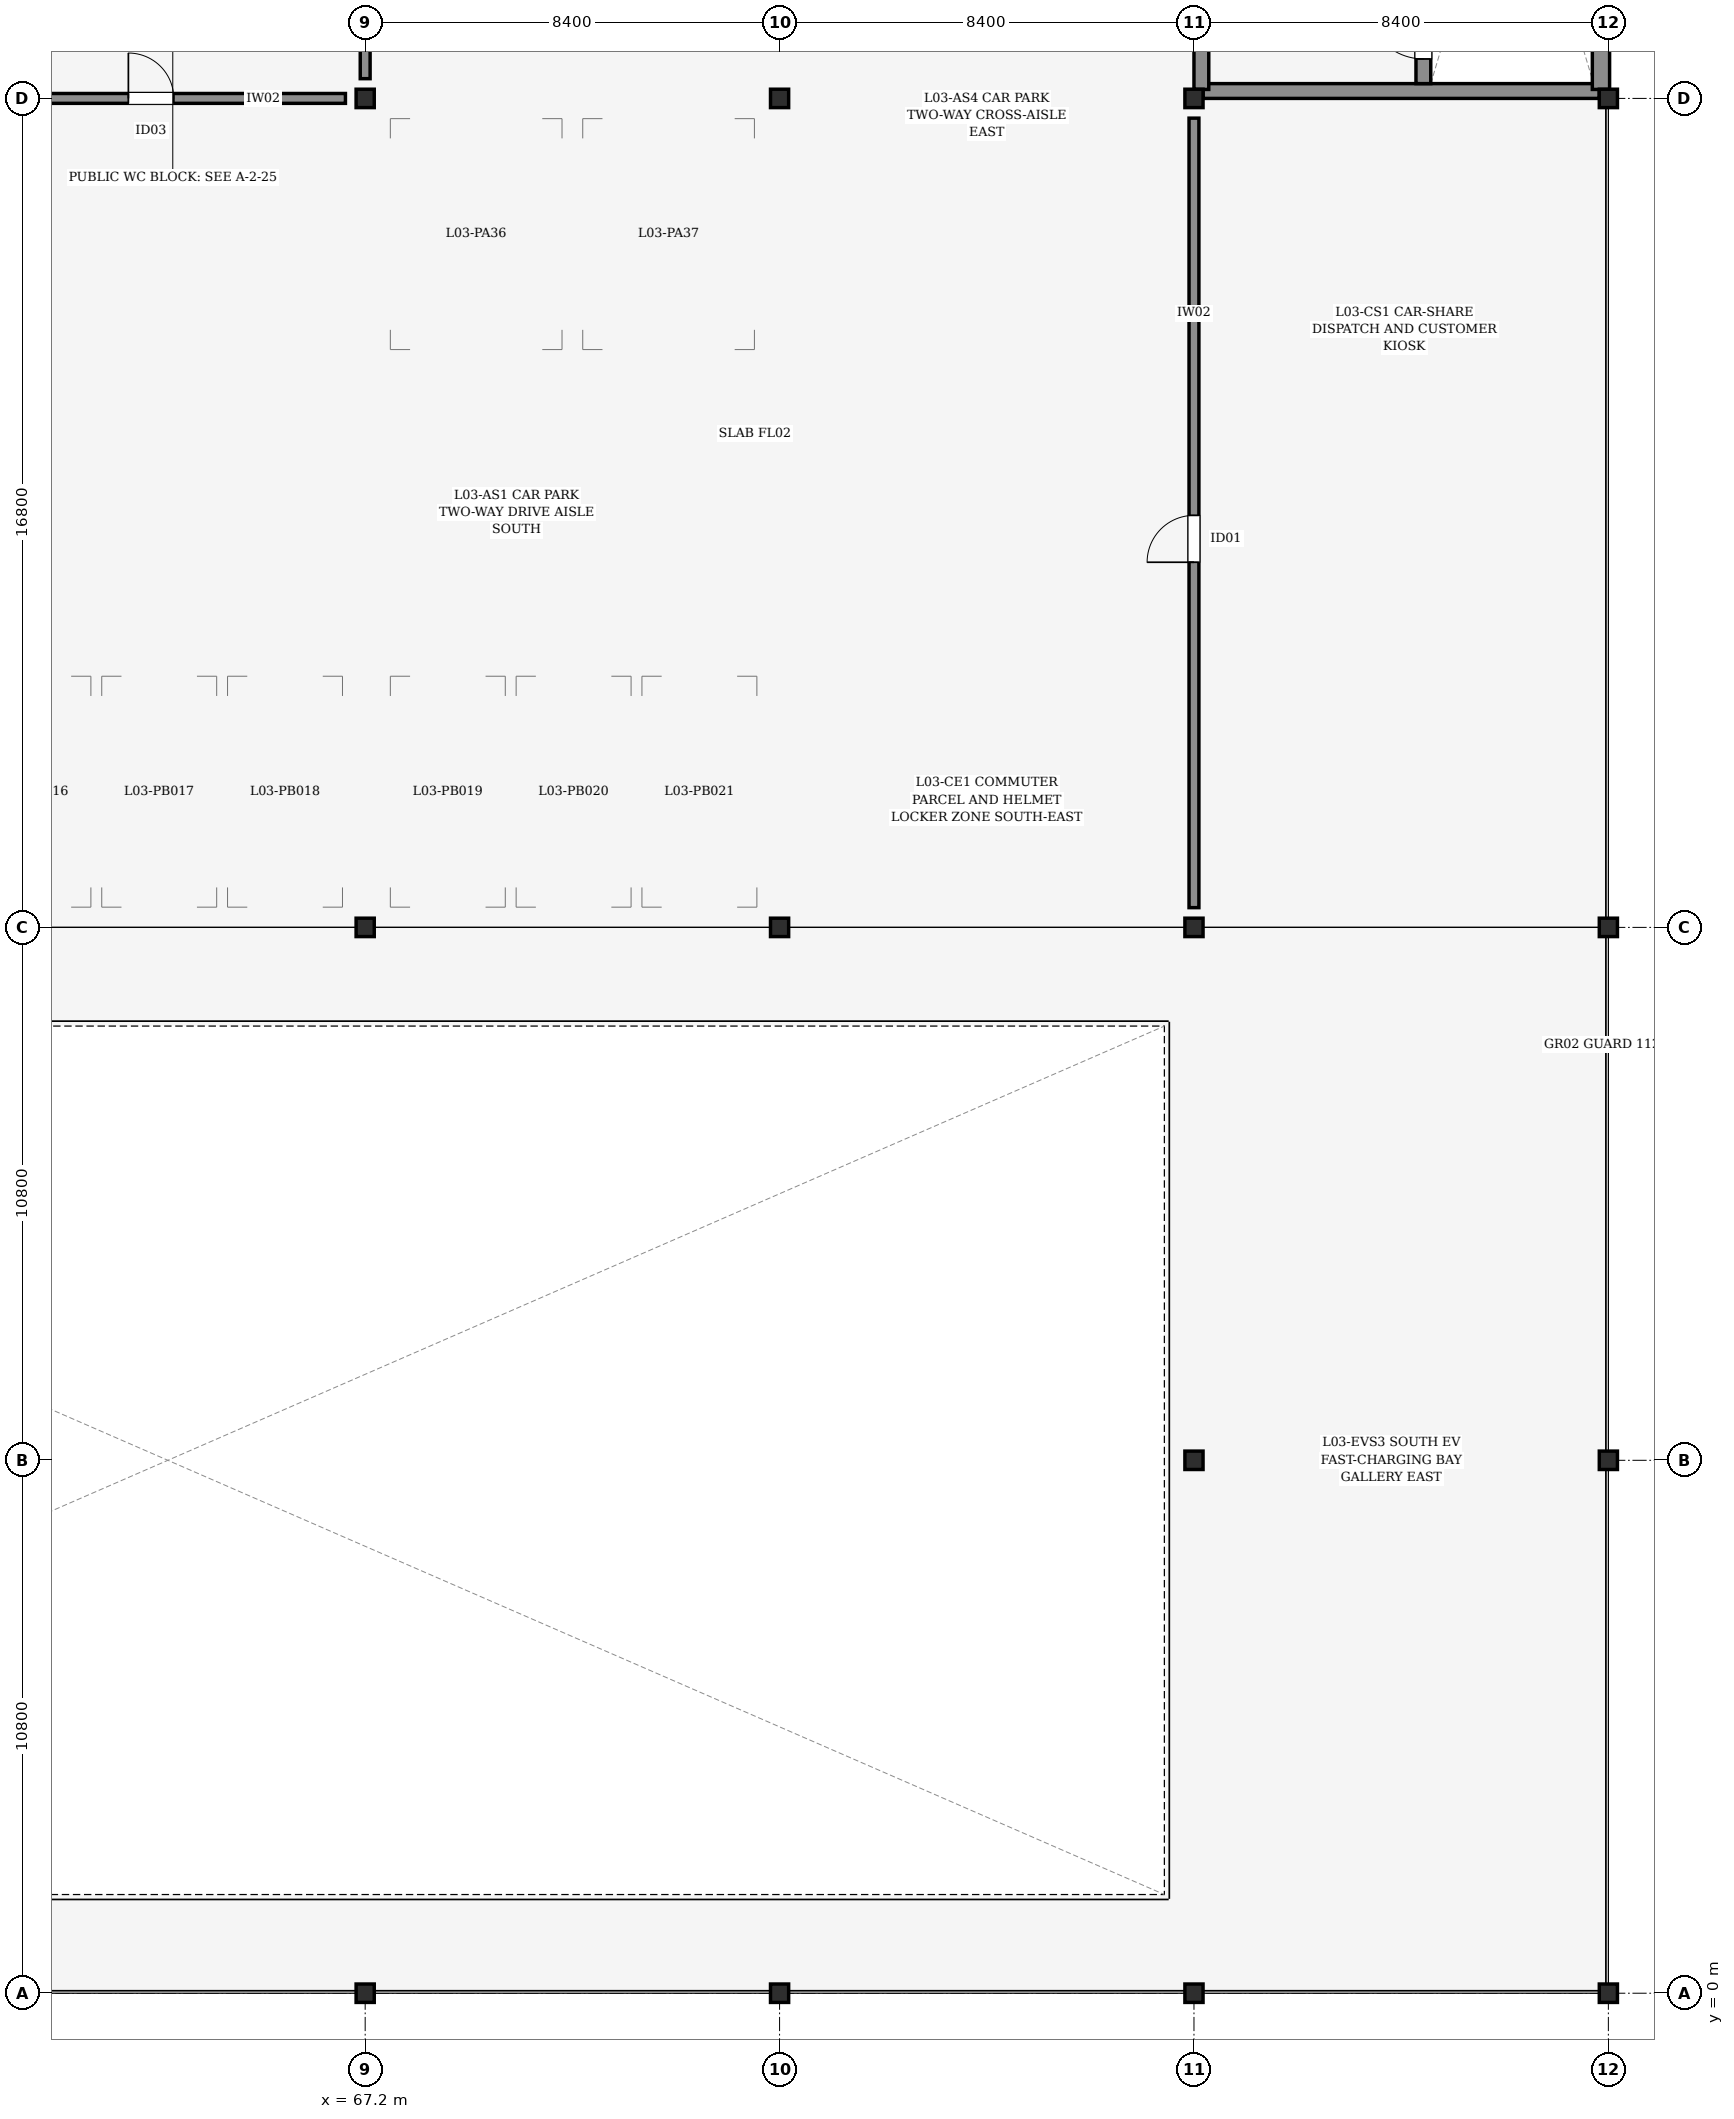
"""IFC4 building model, lengths in metres.
Left out: names, types, materials, properties, quantities, classifications, styles, units other than length and angle.
Written with IfcOpenShell. Run it as: python <this file> out.ifc"""

import sys

from ifc_helpers import new_model, si_unit, direction, frame, frame_2d, origin, origin_2d, place, context, subcontext, project, spatial, rectangle, i_section, extrude, element, fill, save


model = new_model("IFC4")
c1 = context("Model", 3, precision=1e-05, world=origin(), true_north=direction((0.0, 1.0)))
c2 = subcontext(c1, "Body", "Model", "MODEL_VIEW")
j1 = project(units=[si_unit("LENGTHUNIT", "METRE"), si_unit("PLANEANGLEUNIT", "RADIAN")], contexts=[c1])
p1 = place(None, origin())
s1 = spatial("IfcSite", under=j1, at=p1, CompositionType="ELEMENT")
p2 = place(p1, origin())
s2 = spatial("IfcBuilding", under=s1, at=p2, CompositionType="ELEMENT")
p3 = place(p2, frame((0.0, 0.0, 12.6)))
s3 = spatial("IfcBuildingStorey", under=s2, at=p3, CompositionType="ELEMENT", Elevation=12.6)
for number, where, z_axis, x_axis in (
    (1, (67.2, 0.0, 0.0), (0.0, 0.0, 1.0), (1.0, 0.0, 0.0)),
    (2, (67.2, 21.6, 0.0), (0.0, 0.0, 1.0), (1.0, 0.0, 0.0)),
    (3, (67.2, 38.4, 0.0), (0.0, 0.0, 1.0), (1.0, 0.0, 0.0)),
    (4, (75.6, 0.0, 0.0), (0.0, 0.0, 1.0), (1.0, 0.0, 0.0)),
    (5, (75.6, 21.6, 0.0), (0.0, 0.0, 1.0), (1.0, 0.0, 0.0)),
    (6, (75.6, 38.4, 0.0), (0.0, 0.0, 1.0), (1.0, 0.0, 0.0)),
    (7, (84.0, 0.0, 0.0), (0.0, 0.0, 1.0), (1.0, 0.0, 0.0)),
    (8, (84.0, 10.8, 0.0), (0.0, 0.0, 1.0), (1.0, 0.0, 0.0)),
    (9, (84.0, 21.6, 0.0), (0.0, 0.0, 1.0), (1.0, 0.0, 0.0)),
    (10, (84.0, 38.4, 0.0), (0.0, 0.0, 1.0), (1.0, 0.0, 0.0)),
    (11, (92.4, 0.0, 0.0), (0.0, 0.0, 1.0), (1.0, 0.0, 0.0)),
    (12, (92.4, 10.8, 0.0), (0.0, 0.0, 1.0), (1.0, 0.0, 0.0)),
    (13, (92.4, 21.6, 0.0), (0.0, 0.0, 1.0), (1.0, 0.0, 0.0)),
    (14, (92.4, 38.4, 0.0), (0.0, 0.0, 1.0), (1.0, 0.0, 0.0)),
):
    element("IfcColumn", number, at=place(p3, frame(where, z_axis=z_axis, x_axis=x_axis)), inside=s3, PredefinedType="COLUMN", context=c2, shape_type="SweptSolid", body=[
        extrude(i_section(OverallWidth=0.373, OverallDepth=0.368, WebThickness=0.014, FlangeThickness=0.024, FilletRadius=0.015, at=origin_2d()), origin(), (0.0, 0.0, 1.0), 3.6),
    ])
p4 = place(p3, frame((84.185, 38.55, 0.0), z_axis=(0.0, 0.0, 1.0), x_axis=(1.0, 0.0, 0.0)))
e15 = element("IfcWall", 15, at=p4, inside=s3, PredefinedType="SHEAR", context=c2, shape_type="SweptSolid", body=[
    extrude(rectangle(XDim=8.031, YDim=0.3, at=frame_2d((4.016, 0.0))), origin(), (0.0, 0.0, 1.0), 3.38),
])
p5 = place(p3, frame((92.25, 38.582, 0.0), z_axis=(0.0, 0.0, 1.0), x_axis=(0.0, 1.0, 0.0)))
e16 = element("IfcWall", 16, at=p5, inside=s3, PredefinedType="SHEAR", context=c2, shape_type="SweptSolid", body=[
    extrude(rectangle(XDim=16.436, YDim=0.35, at=frame_2d((8.218, 0.0))), origin(), (0.0, 0.0, 1.0), 3.38),
])
p6 = place(p3, frame((84.15, 38.582, 0.0), z_axis=(0.0, 0.0, 1.0), x_axis=(0.0, 1.0, 0.0)))
e17 = element("IfcWall", 17, at=p6, inside=s3, PredefinedType="SHEAR", context=c2, shape_type="SweptSolid", body=[
    extrude(rectangle(XDim=16.436, YDim=0.3, at=frame_2d((8.218, 0.0))), origin(), (0.0, 0.0, 1.0), 3.38),
])
p7 = place(p6, frame((5.668, 0.0, 0.0)))
e18 = element("IfcOpeningElement", 18, at=p7, cuts=e17, PredefinedType="OPENING", context=c2, shape_type="SweptSolid", body=[
    extrude(rectangle(XDim=1.25, YDim=2.15, at=frame_2d((0.625, 1.075))), frame((0.0, 0.16, 0.0), z_axis=(0.0, -1.0, 0.0), x_axis=(1.0, 0.0, 0.0)), (0.0, 0.0, 1.0), 0.32),
])
p8 = place(p3, frame((88.65, 38.7, 0.0), z_axis=(0.0, 0.0, 1.0), x_axis=(0.0, 1.0, 0.0)))
e19 = element("IfcWall", 19, at=p8, inside=s3, PredefinedType="SHEAR", context=c2, shape_type="SweptSolid", body=[
    extrude(rectangle(XDim=16.2, YDim=0.3, at=frame_2d((8.1, 0.0))), origin(), (0.0, 0.0, 1.0), 3.38),
])
p9 = place(p8, frame((0.5, 0.0, 0.0)))
e20 = element("IfcOpeningElement", 20, at=p9, cuts=e19, PredefinedType="OPENING", context=c2, shape_type="SweptSolid", body=[
    extrude(rectangle(XDim=1.15, YDim=2.15, at=frame_2d((0.575, 1.075))), frame((0.0, 0.16, 0.0), z_axis=(0.0, -1.0, 0.0), x_axis=(1.0, 0.0, 0.0)), (0.0, 0.0, 1.0), 0.32),
])
p10 = place(p3, frame((59.2, 38.4, 0.0), z_axis=(0.0, 0.0, 1.0), x_axis=(1.0, 0.0, 0.0)))
e21 = element("IfcWall", 21, at=p10, inside=s3, PredefinedType="PARTITIONING", context=c2, shape_type="SweptSolid", body=[
    extrude(rectangle(XDim=7.6, YDim=0.2, at=frame_2d((3.8, 0.0))), origin(), (0.0, 0.0, 1.0), 2.525),
])
p11 = place(p10, frame((3.2, 0.0, 0.0)))
e22 = element("IfcOpeningElement", 22, at=p11, cuts=e21, PredefinedType="OPENING", context=c2, shape_type="SweptSolid", body=[
    extrude(rectangle(XDim=0.92, YDim=2.1, at=frame_2d((0.46, 1.05))), frame((0.0, 0.11, 0.0), z_axis=(0.0, -1.0, 0.0), x_axis=(1.0, 0.0, 0.0)), (0.0, 0.0, 1.0), 0.22),
])
p12 = place(p3, frame((67.2, 38.8, 0.0), z_axis=(0.0, 0.0, 1.0), x_axis=(0.0, 1.0, 0.0)))
e23 = element("IfcWall", 23, at=p12, inside=s3, PredefinedType="PARTITIONING", context=c2, shape_type="SweptSolid", body=[
    extrude(rectangle(XDim=7.6, YDim=0.2, at=frame_2d((3.8, 0.0))), origin(), (0.0, 0.0, 1.0), 2.525),
])
p13 = place(p3, frame((84.0, 22.0, 0.0), z_axis=(0.0, 0.0, 1.0), x_axis=(0.0, 1.0, 0.0)))
e24 = element("IfcWall", 24, at=p13, inside=s3, PredefinedType="PARTITIONING", context=c2, shape_type="SweptSolid", body=[
    extrude(rectangle(XDim=16.0, YDim=0.2, at=frame_2d((8.0, 0.0))), origin(), (0.0, 0.0, 1.0), 2.525),
])
p14 = place(p13, frame((7.0, 0.0, 0.0)))
e25 = element("IfcOpeningElement", 25, at=p14, cuts=e24, PredefinedType="OPENING", context=c2, shape_type="SweptSolid", body=[
    extrude(rectangle(XDim=0.95, YDim=2.1, at=frame_2d((0.475, 1.05))), frame((0.0, 0.11, 0.0), z_axis=(0.0, -1.0, 0.0), x_axis=(1.0, 0.0, 0.0)), (0.0, 0.0, 1.0), 0.22),
])
p15 = place(p9, origin())
e26 = element("IfcDoor", 26, at=p15, inside=s3, OperationType="SINGLE_SWING_RIGHT", PredefinedType="DOOR", context=c2, shape_type="SweptSolid", body=[
    extrude(rectangle(XDim=1.15, YDim=2.15, at=frame_2d((0.575, 1.075))), frame((0.0, 0.025, 0.0), z_axis=(0.0, -1.0, 0.0), x_axis=(1.0, 0.0, 0.0)), (0.0, 0.0, 1.0), 0.05),
])
fill(e20, e26)
p16 = place(p11, origin())
e27 = element("IfcDoor", 27, at=p16, inside=s3, OperationType="SINGLE_SWING_LEFT", PredefinedType="DOOR", context=c2, shape_type="SweptSolid", body=[
    extrude(rectangle(XDim=0.92, YDim=2.1, at=frame_2d((0.46, 1.05))), frame((0.0, 0.025, 0.0), z_axis=(0.0, -1.0, 0.0), x_axis=(1.0, 0.0, 0.0)), (0.0, 0.0, 1.0), 0.05),
])
fill(e22, e27)
p17 = place(p14, origin())
e28 = element("IfcDoor", 28, at=p17, inside=s3, OperationType="SINGLE_SWING_LEFT", PredefinedType="DOOR", context=c2, shape_type="SweptSolid", body=[
    extrude(rectangle(XDim=0.95, YDim=2.1, at=frame_2d((0.475, 1.05))), frame((0.0, 0.025, 0.0), z_axis=(0.0, -1.0, 0.0), x_axis=(1.0, 0.0, 0.0)), (0.0, 0.0, 1.0), 0.05),
])
fill(e25, e28)
save(model, sys.argv[1])
